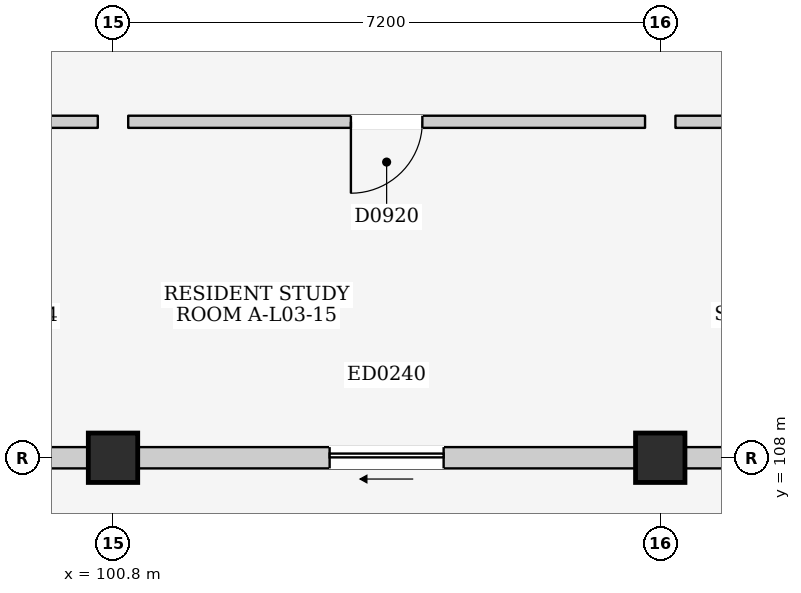
"""IFC4 building model, lengths in metres.
Left out: names, types, materials, properties, quantities, classifications, styles, units other than length and angle.
Written with IfcOpenShell. Run it as: python <this file> out.ifc"""

import sys

from ifc_helpers import new_model, si_unit, direction, frame, frame_2d, origin, origin_2d, place, context, subcontext, project, spatial, rectangle, extrude, element, fill, save


model = new_model("IFC4")
c1 = context("Model", 3, precision=1e-05, world=origin(), true_north=direction((0.0, 1.0)))
c2 = subcontext(c1, "Body", "Model", "MODEL_VIEW")
j1 = project(units=[si_unit("LENGTHUNIT", "METRE"), si_unit("PLANEANGLEUNIT", "RADIAN")], contexts=[c1])
p1 = place(None, origin())
s1 = spatial("IfcSite", under=j1, at=p1, CompositionType="ELEMENT")
p2 = place(p1, origin())
s2 = spatial("IfcBuilding", under=s1, at=p2, CompositionType="ELEMENT")
p3 = place(p2, frame((0.0, 0.0, 12.2)))
s3 = spatial("IfcBuildingStorey", under=s2, at=p3, CompositionType="ELEMENT", Elevation=12.2)
for number, where, z_axis, x_axis in (
    (1, (100.8, 108.0, 0.0), (0.0, 0.0, 1.0), (1.0, 0.0, 0.0)),
    (2, (108.0, 108.0, 0.0), (0.0, 0.0, 1.0), (1.0, 0.0, 0.0)),
):
    element("IfcColumn", number, at=place(p3, frame(where, z_axis=z_axis, x_axis=x_axis)), inside=s3, PredefinedType="COLUMN", context=c2, shape_type="SweptSolid", body=[
        extrude(rectangle(XDim=0.65, YDim=0.65, at=origin_2d()), origin(), (0.0, 0.0, 1.0), 3.2),
    ])
p4 = place(p3, frame((93.925, 108.0, 0.0), z_axis=(0.0, 0.0, 1.0), x_axis=(1.0, 0.0, 0.0)))
e3 = element("IfcWall", 3, at=p4, inside=s3, PredefinedType="ELEMENTEDWALL", context=c2, shape_type="SweptSolid", body=[
    extrude(rectangle(XDim=6.55, YDim=0.28, at=frame_2d((3.275, 0.0))), origin(), (0.0, 0.0, 1.0), 2.315),
])
p5 = place(p4, frame((2.525, 0.0, 0.0)))
e4 = element("IfcOpeningElement", 4, at=p5, cuts=e3, PredefinedType="OPENING", context=c2, shape_type="SweptSolid", body=[
    extrude(rectangle(XDim=1.5, YDim=2.12, at=frame_2d((0.75, 1.06))), frame((0.0, 0.155, 0.0), z_axis=(0.0, -1.0, 0.0), x_axis=(1.0, 0.0, 0.0)), (0.0, 0.0, 1.0), 0.31),
])
p6 = place(p3, frame((101.125, 108.0, 0.0), z_axis=(0.0, 0.0, 1.0), x_axis=(1.0, 0.0, 0.0)))
e5 = element("IfcWall", 5, at=p6, inside=s3, PredefinedType="ELEMENTEDWALL", context=c2, shape_type="SweptSolid", body=[
    extrude(rectangle(XDim=6.55, YDim=0.28, at=frame_2d((3.275, 0.0))), origin(), (0.0, 0.0, 1.0), 2.315),
])
p7 = place(p6, frame((2.525, 0.0, 0.0)))
e6 = element("IfcOpeningElement", 6, at=p7, cuts=e5, PredefinedType="OPENING", context=c2, shape_type="SweptSolid", body=[
    extrude(rectangle(XDim=1.5, YDim=2.12, at=frame_2d((0.75, 1.06))), frame((0.0, 0.155, 0.0), z_axis=(0.0, -1.0, 0.0), x_axis=(1.0, 0.0, 0.0)), (0.0, 0.0, 1.0), 0.31),
])
p8 = place(p3, frame((108.325, 108.0, 0.0), z_axis=(0.0, 0.0, 1.0), x_axis=(1.0, 0.0, 0.0)))
e7 = element("IfcWall", 7, at=p8, inside=s3, PredefinedType="ELEMENTEDWALL", context=c2, shape_type="SweptSolid", body=[
    extrude(rectangle(XDim=6.55, YDim=0.28, at=frame_2d((3.275, 0.0))), origin(), (0.0, 0.0, 1.0), 2.315),
])
p9 = place(p8, frame((2.525, 0.0, 0.0)))
e8 = element("IfcOpeningElement", 8, at=p9, cuts=e7, PredefinedType="OPENING", context=c2, shape_type="SweptSolid", body=[
    extrude(rectangle(XDim=1.5, YDim=2.12, at=frame_2d((0.75, 1.06))), frame((0.0, 0.155, 0.0), z_axis=(0.0, -1.0, 0.0), x_axis=(1.0, 0.0, 0.0)), (0.0, 0.0, 1.0), 0.31),
])
p10 = place(p3, frame((93.8, 112.42, 0.0), z_axis=(0.0, 0.0, 1.0), x_axis=(1.0, 0.0, 0.0)))
e9 = element("IfcWall", 9, at=p10, inside=s3, PredefinedType="PARTITIONING", context=c2, shape_type="SweptSolid", body=[
    extrude(rectangle(XDim=6.8, YDim=0.16, at=frame_2d((3.4, 0.0))), origin(), (0.0, 0.0, 1.0), 2.98),
])
p11 = place(p10, frame((2.93, 0.0, 0.0)))
e10 = element("IfcOpeningElement", 10, at=p11, cuts=e9, PredefinedType="OPENING", context=c2, shape_type="SweptSolid", body=[
    extrude(rectangle(XDim=0.94, YDim=2.12, at=frame_2d((0.47, 1.06))), frame((0.0, 0.095, 0.0), z_axis=(0.0, -1.0, 0.0), x_axis=(1.0, 0.0, 0.0)), (0.0, 0.0, 1.0), 0.19),
])
p12 = place(p3, frame((101.0, 112.42, 0.0), z_axis=(0.0, 0.0, 1.0), x_axis=(1.0, 0.0, 0.0)))
e11 = element("IfcWall", 11, at=p12, inside=s3, PredefinedType="PARTITIONING", context=c2, shape_type="SweptSolid", body=[
    extrude(rectangle(XDim=6.8, YDim=0.16, at=frame_2d((3.4, 0.0))), origin(), (0.0, 0.0, 1.0), 2.98),
])
p13 = place(p12, frame((2.93, 0.0, 0.0)))
e12 = element("IfcOpeningElement", 12, at=p13, cuts=e11, PredefinedType="OPENING", context=c2, shape_type="SweptSolid", body=[
    extrude(rectangle(XDim=0.94, YDim=2.12, at=frame_2d((0.47, 1.06))), frame((0.0, 0.095, 0.0), z_axis=(0.0, -1.0, 0.0), x_axis=(1.0, 0.0, 0.0)), (0.0, 0.0, 1.0), 0.19),
])
p14 = place(p3, frame((108.2, 112.42, 0.0), z_axis=(0.0, 0.0, 1.0), x_axis=(1.0, 0.0, 0.0)))
e13 = element("IfcWall", 13, at=p14, inside=s3, PredefinedType="PARTITIONING", context=c2, shape_type="SweptSolid", body=[
    extrude(rectangle(XDim=6.72, YDim=0.16, at=frame_2d((3.36, 0.0))), origin(), (0.0, 0.0, 1.0), 2.98),
])
p15 = place(p14, frame((2.89, 0.0, 0.0)))
e14 = element("IfcOpeningElement", 14, at=p15, cuts=e13, PredefinedType="OPENING", context=c2, shape_type="SweptSolid", body=[
    extrude(rectangle(XDim=0.94, YDim=2.12, at=frame_2d((0.47, 1.06))), frame((0.0, 0.095, 0.0), z_axis=(0.0, -1.0, 0.0), x_axis=(1.0, 0.0, 0.0)), (0.0, 0.0, 1.0), 0.19),
])
p16 = place(p7, frame((1.5, 0.0, 0.0), z_axis=(0.0, 0.0, 1.0), x_axis=(-1.0, 0.0, 0.0)))
e15 = element("IfcDoor", 15, at=p16, inside=s3, OperationType="SLIDING_TO_LEFT", PredefinedType="DOOR", context=c2, shape_type="SweptSolid", body=[
    extrude(rectangle(XDim=1.5, YDim=2.12, at=frame_2d((0.75, 1.06))), frame((0.0, 0.025, 0.0), z_axis=(0.0, -1.0, 0.0), x_axis=(1.0, 0.0, 0.0)), (0.0, 0.0, 1.0), 0.05),
])
fill(e6, e15)
p17 = place(p13, frame((0.94, 0.0, 0.0), z_axis=(0.0, 0.0, 1.0), x_axis=(-1.0, 0.0, 0.0)))
e16 = element("IfcDoor", 16, at=p17, inside=s3, OperationType="SINGLE_SWING_RIGHT", PredefinedType="DOOR", context=c2, shape_type="SweptSolid", body=[
    extrude(rectangle(XDim=0.94, YDim=2.12, at=frame_2d((0.47, 1.06))), frame((0.0, 0.025, 0.0), z_axis=(0.0, -1.0, 0.0), x_axis=(1.0, 0.0, 0.0)), (0.0, 0.0, 1.0), 0.05),
])
fill(e12, e16)
save(model, sys.argv[1])
